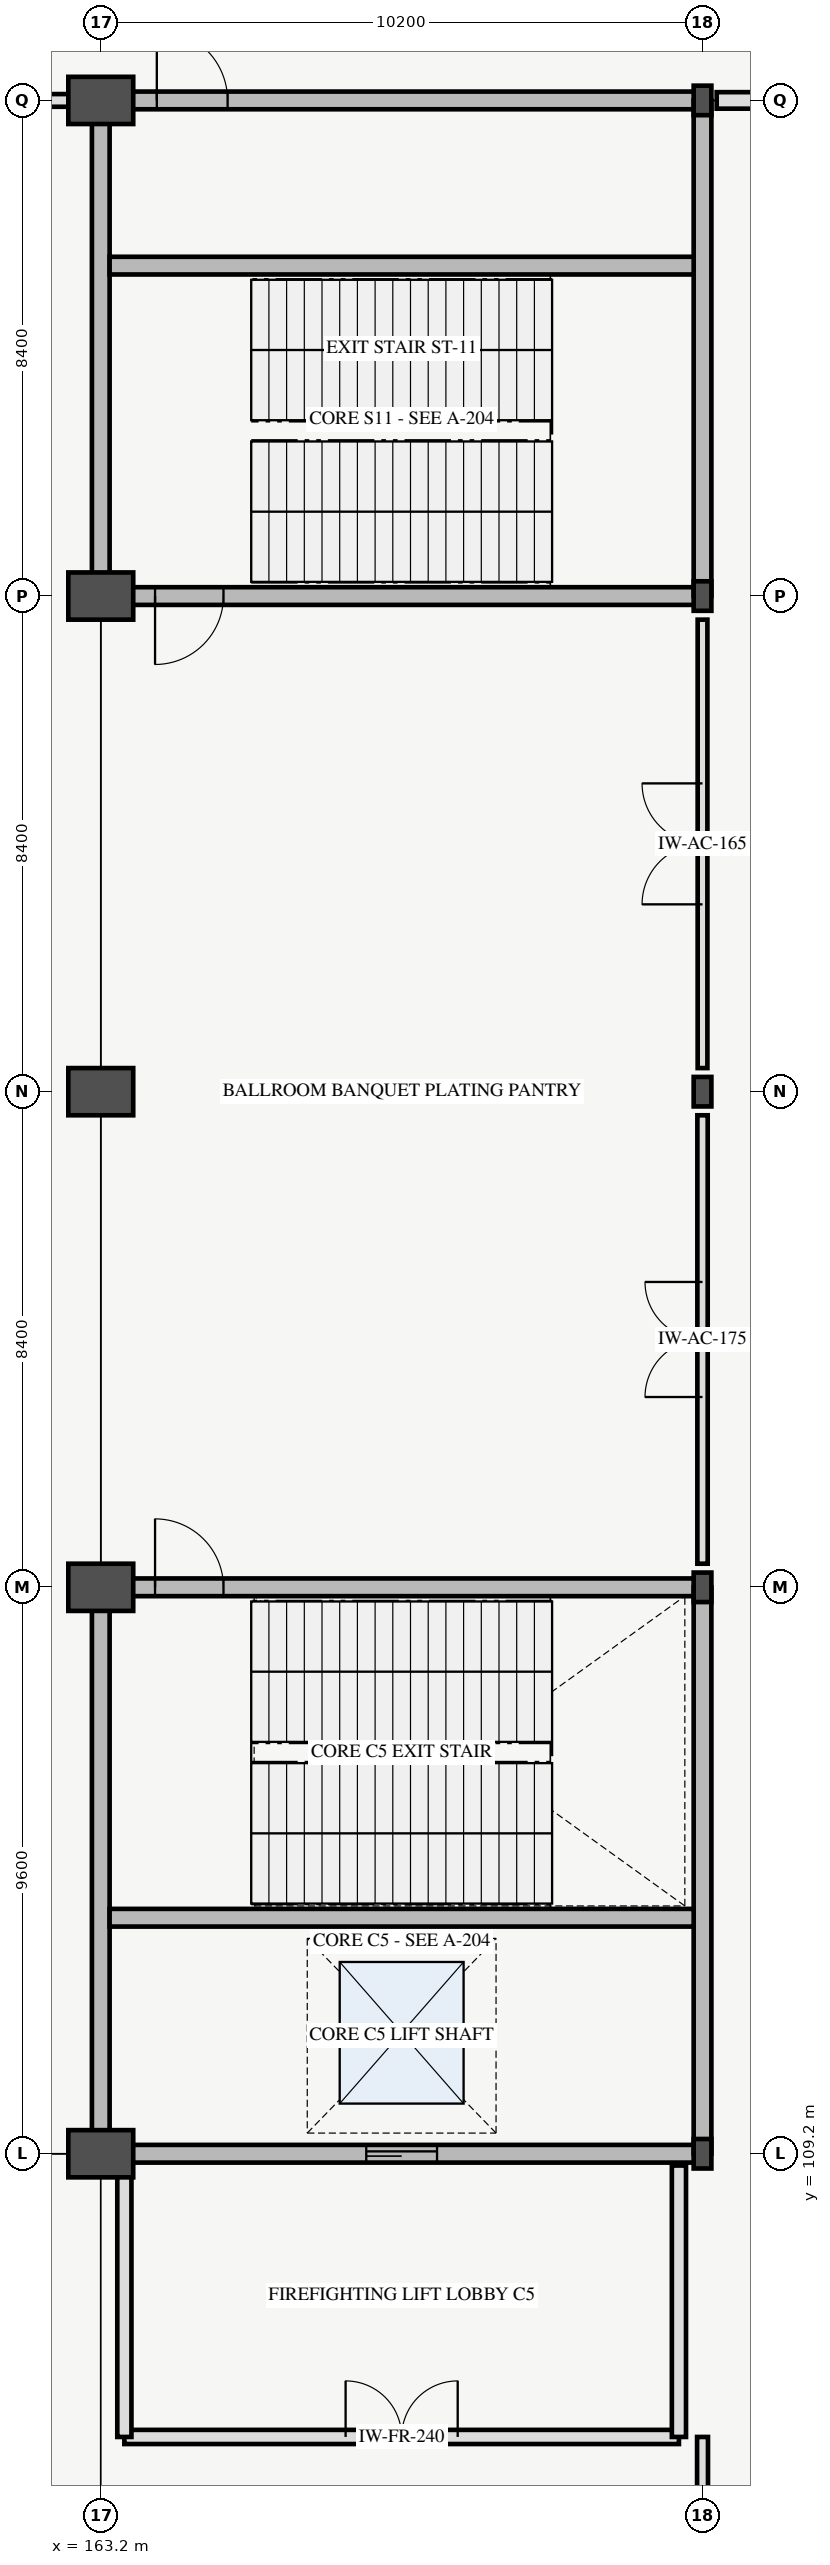
"""IFC4 building model, lengths in metres.
Left out: names, types, materials, properties, quantities, classifications, styles, units other than length and angle.
Written with IfcOpenShell. Run it as: python <this file> out.ifc"""

import sys

from ifc_helpers import new_model, si_unit, direction, frame, frame_2d, origin, origin_2d, place, context, subcontext, project, spatial, rectangle, i_section, extrude, element, fill, save


model = new_model("IFC4")
c1 = context("Model", 3, precision=1e-05, world=origin(), true_north=direction((0.0, 1.0)))
c2 = subcontext(c1, "Body", "Model", "MODEL_VIEW")
j1 = project(units=[si_unit("LENGTHUNIT", "METRE"), si_unit("PLANEANGLEUNIT", "RADIAN")], contexts=[c1])
p1 = place(None, origin())
s1 = spatial("IfcSite", under=j1, at=p1, CompositionType="ELEMENT")
p2 = place(p1, origin())
s2 = spatial("IfcBuilding", under=s1, at=p2, CompositionType="ELEMENT")
p3 = place(p2, origin())
s3 = spatial("IfcBuildingStorey", under=s2, at=p3, CompositionType="ELEMENT", Elevation=0.0)
for number, where, z_axis, x_axis in (
    (1, (163.2, 109.2, 0.0), (0.0, 0.0, 1.0), (1.0, 0.0, 0.0)),
    (2, (163.2, 118.8, 0.0), (0.0, 0.0, 1.0), (1.0, 0.0, 0.0)),
    (3, (163.2, 127.2, 0.0), (0.0, 0.0, 1.0), (1.0, 0.0, 0.0)),
    (4, (163.2, 135.6, 0.0), (0.0, 0.0, 1.0), (1.0, 0.0, 0.0)),
    (5, (163.2, 144.0, 0.0), (0.0, 0.0, 1.0), (1.0, 0.0, 0.0)),
):
    element("IfcColumn", number, at=place(p3, frame(where, z_axis=z_axis, x_axis=x_axis)), inside=s3, PredefinedType="COLUMN", context=c2, shape_type="SweptSolid", body=[
        extrude(rectangle(XDim=1.1, YDim=0.8, at=origin_2d()), origin(), (0.0, 0.0, 1.0), 5.4),
    ])
for number, where, z_axis, x_axis in (
    (6, (173.4, 109.2, 0.0), (0.0, 0.0, 1.0), (1.0, 0.0, 0.0)),
    (7, (173.4, 118.8, 0.0), (0.0, 0.0, 1.0), (1.0, 0.0, 0.0)),
    (8, (173.4, 127.2, 0.0), (0.0, 0.0, 1.0), (1.0, 0.0, 0.0)),
    (9, (173.4, 135.6, 0.0), (0.0, 0.0, 1.0), (1.0, 0.0, 0.0)),
    (10, (173.4, 144.0, 0.0), (0.0, 0.0, 1.0), (1.0, 0.0, 0.0)),
):
    element("IfcColumn", number, at=place(p3, frame(where, z_axis=z_axis, x_axis=x_axis)), inside=s3, PredefinedType="COLUMN", context=c2, shape_type="SweptSolid", body=[
        extrude(i_section(OverallWidth=0.3, OverallDepth=0.5, WebThickness=0.014, FlangeThickness=0.028, FilletRadius=0.027, at=origin_2d()), origin(), (0.0, 0.0, 1.0), 5.4),
    ])
p4 = place(p3, frame((163.2, 109.2, 0.0), z_axis=(0.0, 0.0, 1.0), x_axis=(1.0, 0.0, 0.0)))
e11 = element("IfcWall", 11, at=p4, inside=s3, PredefinedType="SHEAR", context=c2, shape_type="SweptSolid", body=[
    extrude(rectangle(XDim=10.2, YDim=0.3, at=frame_2d((5.1, 0.0))), origin(), (0.0, 0.0, 1.0), 5.4),
])
p5 = place(p4, frame((4.5, 0.0, 0.0)))
e12 = element("IfcOpeningElement", 12, at=p5, cuts=e11, PredefinedType="OPENING", context=c2, shape_type="SweptSolid", body=[
    extrude(rectangle(XDim=1.2, YDim=2.25, at=frame_2d((0.6, 1.125))), frame((0.0, 0.16, 0.0), z_axis=(0.0, -1.0, 0.0), x_axis=(1.0, 0.0, 0.0)), (0.0, 0.0, 1.0), 0.32),
])
p6 = place(p3, frame((163.2, 118.8, 0.0), z_axis=(0.0, 0.0, 1.0), x_axis=(1.0, 0.0, 0.0)))
e13 = element("IfcWall", 13, at=p6, inside=s3, PredefinedType="SHEAR", context=c2, shape_type="SweptSolid", body=[
    extrude(rectangle(XDim=10.2, YDim=0.3, at=frame_2d((5.1, 0.0))), origin(), (0.0, 0.0, 1.0), 5.4),
])
p7 = place(p6, frame((0.92, 0.0, 0.0)))
e14 = element("IfcOpeningElement", 14, at=p7, cuts=e13, PredefinedType="OPENING", context=c2, shape_type="SweptSolid", body=[
    extrude(rectangle(XDim=1.16, YDim=2.2, at=frame_2d((0.58, 1.1))), frame((0.0, 0.16, 0.0), z_axis=(0.0, -1.0, 0.0), x_axis=(1.0, 0.0, 0.0)), (0.0, 0.0, 1.0), 0.32),
])
for number, where, z_axis, x_axis in (
    (15, (163.2, 109.2, 0.0), (0.0, 0.0, 1.0), (0.0, 1.0, 0.0)),
    (16, (173.4, 109.2, 0.0), (0.0, 0.0, 1.0), (0.0, 1.0, 0.0)),
):
    element("IfcWall", number, at=place(p3, frame(where, z_axis=z_axis, x_axis=x_axis)), inside=s3, PredefinedType="SHEAR", context=c2, shape_type="SweptSolid", body=[
        extrude(rectangle(XDim=9.6, YDim=0.3, at=frame_2d((4.8, 0.0))), origin(), (0.0, 0.0, 1.0), 5.4),
    ])
p8 = place(p3, frame((173.64, 144.0, 0.0), z_axis=(0.0, 0.0, 1.0), x_axis=(1.0, 0.0, 0.0)))
e17 = element("IfcWall", 17, at=p8, inside=s3, PredefinedType="STANDARD", context=c2, shape_type="SweptSolid", body=[
    extrude(rectangle(XDim=9.72, YDim=0.28, at=frame_2d((4.86, 0.0))), origin(), (0.0, 0.0, 1.0), 3.68),
])
p9 = place(p8, frame((1.905, 0.0, 0.0)))
e18 = element("IfcOpeningElement", 18, at=p9, cuts=e17, PredefinedType="OPENING", context=c2, shape_type="SweptSolid", body=[
    extrude(rectangle(XDim=2.8, YDim=2.45, at=frame_2d((1.4, 1.225))), frame((0.0, 0.15, 0.0), z_axis=(0.0, -1.0, 0.0), x_axis=(1.0, 0.0, 0.0)), (0.0, 0.0, 1.0), 0.3),
])
p10 = place(p8, frame((5.893, 0.0, 0.0)))
e19 = element("IfcOpeningElement", 19, at=p10, cuts=e17, PredefinedType="OPENING", context=c2, shape_type="SweptSolid", body=[
    extrude(rectangle(XDim=2.6, YDim=2.4, at=frame_2d((1.3, 1.2))), frame((0.0, 0.15, 0.0), z_axis=(0.0, -1.0, 0.0), x_axis=(1.0, 0.0, 0.0)), (0.0, 0.0, 1.0), 0.3),
])
p11 = place(p3, frame((122.64, 144.0, 0.0), z_axis=(0.0, 0.0, 1.0), x_axis=(1.0, 0.0, 0.0)))
e20 = element("IfcWall", 20, at=p11, inside=s3, PredefinedType="SOLIDWALL", context=c2, shape_type="SweptSolid", body=[
    extrude(rectangle(XDim=40.32, YDim=0.215, at=frame_2d((20.16, 0.0))), origin(), (0.0, 0.0, 1.0), 3.68),
])
p12 = place(p11, frame((7.68, 0.0, 0.0)))
e21 = element("IfcOpeningElement", 21, at=p12, cuts=e20, PredefinedType="OPENING", context=c2, shape_type="SweptSolid", body=[
    extrude(rectangle(XDim=4.8, YDim=3.4, at=frame_2d((2.4, 1.7))), frame((0.0, 0.117, 0.0), z_axis=(0.0, -1.0, 0.0), x_axis=(1.0, 0.0, 0.0)), (0.0, 0.0, 1.0), 0.235),
])
p13 = place(p11, frame((29.69, 0.0, 0.0)))
e22 = element("IfcOpeningElement", 22, at=p13, cuts=e20, PredefinedType="OPENING", context=c2, shape_type="SweptSolid", body=[
    extrude(rectangle(XDim=1.1, YDim=2.2, at=frame_2d((0.55, 1.1))), frame((0.0, 0.117, 0.0), z_axis=(0.0, -1.0, 0.0), x_axis=(1.0, 0.0, 0.0)), (0.0, 0.0, 1.0), 0.235),
])
p14 = place(p3, frame((163.35, 113.2, 0.0), z_axis=(0.0, 0.0, 1.0), x_axis=(1.0, 0.0, 0.0)))
e23 = element("IfcWall", 23, at=p14, inside=s3, PredefinedType="SHEAR", context=c2, shape_type="SweptSolid", body=[
    extrude(rectangle(XDim=9.9, YDim=0.3, at=frame_2d((4.95, 0.0))), origin(), (0.0, 0.0, 1.0), 5.4),
])
p15 = place(p3, frame((163.2, 135.6, 0.0), z_axis=(0.0, 0.0, 1.0), x_axis=(1.0, 0.0, 0.0)))
e24 = element("IfcWall", 24, at=p15, inside=s3, PredefinedType="SHEAR", context=c2, shape_type="SweptSolid", body=[
    extrude(rectangle(XDim=10.2, YDim=0.3, at=frame_2d((5.1, 0.0))), origin(), (0.0, 0.0, 1.0), 5.4),
])
p16 = place(p15, frame((0.92, 0.0, 0.0)))
e25 = element("IfcOpeningElement", 25, at=p16, cuts=e24, PredefinedType="OPENING", context=c2, shape_type="SweptSolid", body=[
    extrude(rectangle(XDim=1.16, YDim=2.2, at=frame_2d((0.58, 1.1))), frame((0.0, 0.16, 0.0), z_axis=(0.0, -1.0, 0.0), x_axis=(1.0, 0.0, 0.0)), (0.0, 0.0, 1.0), 0.32),
])
p17 = place(p3, frame((163.2, 144.0, 0.0), z_axis=(0.0, 0.0, 1.0), x_axis=(1.0, 0.0, 0.0)))
e26 = element("IfcWall", 26, at=p17, inside=s3, PredefinedType="SHEAR", context=c2, shape_type="SweptSolid", body=[
    extrude(rectangle(XDim=10.2, YDim=0.3, at=frame_2d((5.1, 0.0))), origin(), (0.0, 0.0, 1.0), 5.4),
])
p18 = place(p17, frame((0.95, 0.0, 0.0)))
e27 = element("IfcOpeningElement", 27, at=p18, cuts=e26, PredefinedType="OPENING", context=c2, shape_type="SweptSolid", body=[
    extrude(rectangle(XDim=1.2, YDim=2.2, at=frame_2d((0.6, 1.1))), frame((0.0, 0.16, 0.0), z_axis=(0.0, -1.0, 0.0), x_axis=(1.0, 0.0, 0.0)), (0.0, 0.0, 1.0), 0.32),
])
for number, where, z_axis, x_axis in (
    (28, (163.2, 135.6, 0.0), (0.0, 0.0, 1.0), (0.0, 1.0, 0.0)),
    (29, (173.4, 135.6, 0.0), (0.0, 0.0, 1.0), (0.0, 1.0, 0.0)),
):
    element("IfcWall", number, at=place(p3, frame(where, z_axis=z_axis, x_axis=x_axis)), inside=s3, PredefinedType="SHEAR", context=c2, shape_type="SweptSolid", body=[
        extrude(rectangle(XDim=8.4, YDim=0.3, at=frame_2d((4.2, 0.0))), origin(), (0.0, 0.0, 1.0), 5.4),
    ])
p19 = place(p3, frame((163.35, 141.2, 0.0), z_axis=(0.0, 0.0, 1.0), x_axis=(1.0, 0.0, 0.0)))
e30 = element("IfcWall", 30, at=p19, inside=s3, PredefinedType="SHEAR", context=c2, shape_type="SweptSolid", body=[
    extrude(rectangle(XDim=9.9, YDim=0.3, at=frame_2d((4.95, 0.0))), origin(), (0.0, 0.0, 1.0), 5.4),
])
p20 = place(p3, frame((163.6, 104.4, 0.0), z_axis=(0.0, 0.0, 1.0), x_axis=(1.0, 0.0, 0.0)))
e31 = element("IfcWall", 31, at=p20, inside=s3, PredefinedType="PARTITIONING", context=c2, shape_type="SweptSolid", body=[
    extrude(rectangle(XDim=9.4, YDim=0.24, at=frame_2d((4.7, 0.0))), origin(), (0.0, 0.0, 1.0), 4.08),
])
p21 = place(p20, frame((3.75, 0.0, 0.0)))
e32 = element("IfcOpeningElement", 32, at=p21, cuts=e31, PredefinedType="OPENING", context=c2, shape_type="SweptSolid", body=[
    extrude(rectangle(XDim=1.9, YDim=2.25, at=frame_2d((0.95, 1.125))), frame((0.0, 0.13, 0.0), z_axis=(0.0, -1.0, 0.0), x_axis=(1.0, 0.0, 0.0)), (0.0, 0.0, 1.0), 0.26),
])
for number, where, z_axis, x_axis in (
    (33, (163.6, 104.4, 0.0), (0.0, 0.0, 1.0), (0.0, 1.0, 0.0)),
    (34, (173.0, 104.4, 0.0), (0.0, 0.0, 1.0), (0.0, 1.0, 0.0)),
):
    element("IfcWall", number, at=place(p3, frame(where, z_axis=z_axis, x_axis=x_axis)), inside=s3, PredefinedType="PARTITIONING", context=c2, shape_type="SweptSolid", body=[
        extrude(rectangle(XDim=4.6, YDim=0.24, at=frame_2d((2.3, 0.0))), origin(), (0.0, 0.0, 1.0), 4.08),
    ])
p22 = place(p3, frame((173.4, 100.0, 0.0), z_axis=(0.0, 0.0, 1.0), x_axis=(0.0, 1.0, 0.0)))
e35 = element("IfcWall", 35, at=p22, inside=s3, PredefinedType="PARTITIONING", context=c2, shape_type="SweptSolid", body=[
    extrude(rectangle(XDim=4.4, YDim=0.185, at=frame_2d((2.2, 0.0))), origin(), (0.0, 0.0, 1.0), 4.08),
])
p23 = place(p22, frame((1.275, 0.0, 0.0)))
e36 = element("IfcOpeningElement", 36, at=p23, cuts=e35, PredefinedType="OPENING", context=c2, shape_type="SweptSolid", body=[
    extrude(rectangle(XDim=1.85, YDim=2.32, at=frame_2d((0.925, 1.16))), frame((0.0, 0.103, 0.0), z_axis=(0.0, -1.0, 0.0), x_axis=(1.0, 0.0, 0.0)), (0.0, 0.0, 1.0), 0.205),
])
p24 = place(p3, frame((173.4, 119.2, 0.0), z_axis=(0.0, 0.0, 1.0), x_axis=(0.0, 1.0, 0.0)))
e37 = element("IfcWall", 37, at=p24, inside=s3, PredefinedType="PARTITIONING", context=c2, shape_type="SweptSolid", body=[
    extrude(rectangle(XDim=7.6, YDim=0.175, at=frame_2d((3.8, 0.0))), origin(), (0.0, 0.0, 1.0), 4.08),
])
p25 = place(p24, frame((2.825, 0.0, 0.0)))
e38 = element("IfcOpeningElement", 38, at=p25, cuts=e37, PredefinedType="OPENING", context=c2, shape_type="SweptSolid", body=[
    extrude(rectangle(XDim=1.95, YDim=2.34, at=frame_2d((0.975, 1.17))), frame((0.0, 0.097, 0.0), z_axis=(0.0, -1.0, 0.0), x_axis=(1.0, 0.0, 0.0)), (0.0, 0.0, 1.0), 0.195),
])
p26 = place(p3, frame((173.4, 127.6, 0.0), z_axis=(0.0, 0.0, 1.0), x_axis=(0.0, 1.0, 0.0)))
e39 = element("IfcWall", 39, at=p26, inside=s3, PredefinedType="PARTITIONING", context=c2, shape_type="SweptSolid", body=[
    extrude(rectangle(XDim=7.6, YDim=0.165, at=frame_2d((3.8, 0.0))), origin(), (0.0, 0.0, 1.0), 4.08),
])
p27 = place(p26, frame((2.775, 0.0, 0.0)))
e40 = element("IfcOpeningElement", 40, at=p27, cuts=e39, PredefinedType="OPENING", context=c2, shape_type="SweptSolid", body=[
    extrude(rectangle(XDim=2.05, YDim=2.36, at=frame_2d((1.025, 1.18))), frame((0.0, 0.093, 0.0), z_axis=(0.0, -1.0, 0.0), x_axis=(1.0, 0.0, 0.0)), (0.0, 0.0, 1.0), 0.185),
])
p28 = place(p7, origin())
e41 = element("IfcDoor", 41, at=p28, inside=s3, OperationType="SINGLE_SWING_LEFT", PredefinedType="DOOR", context=c2, shape_type="SweptSolid", body=[
    extrude(rectangle(XDim=1.16, YDim=2.2, at=frame_2d((0.58, 1.1))), frame((0.0, 0.025, 0.0), z_axis=(0.0, -1.0, 0.0), x_axis=(1.0, 0.0, 0.0)), (0.0, 0.0, 1.0), 0.05),
])
fill(e14, e41)
p29 = place(p5, origin())
e42 = element("IfcDoor", 42, at=p29, inside=s3, OperationType="SLIDING_TO_LEFT", PredefinedType="DOOR", context=c2, shape_type="SweptSolid", body=[
    extrude(rectangle(XDim=1.2, YDim=2.25, at=frame_2d((0.6, 1.125))), frame((0.0, 0.025, 0.0), z_axis=(0.0, -1.0, 0.0), x_axis=(1.0, 0.0, 0.0)), (0.0, 0.0, 1.0), 0.05),
])
fill(e12, e42)
p30 = place(p16, origin())
e43 = element("IfcDoor", 43, at=p30, inside=s3, OperationType="SINGLE_SWING_LEFT", PredefinedType="DOOR", context=c2, shape_type="SweptSolid", body=[
    extrude(rectangle(XDim=1.16, YDim=2.2, at=frame_2d((0.58, 1.1))), frame((0.0, 0.025, 0.0), z_axis=(0.0, -1.0, 0.0), x_axis=(1.0, 0.0, 0.0)), (0.0, 0.0, 1.0), 0.05),
])
fill(e25, e43)
p31 = place(p18, origin())
e44 = element("IfcDoor", 44, at=p31, inside=s3, OperationType="SINGLE_SWING_LEFT", PredefinedType="DOOR", context=c2, shape_type="SweptSolid", body=[
    extrude(rectangle(XDim=1.2, YDim=2.2, at=frame_2d((0.6, 1.1))), frame((0.0, 0.025, 0.0), z_axis=(0.0, -1.0, 0.0), x_axis=(1.0, 0.0, 0.0)), (0.0, 0.0, 1.0), 0.05),
])
fill(e27, e44)
p32 = place(p21, origin())
e45 = element("IfcDoor", 45, at=p32, inside=s3, OperationType="DOUBLE_DOOR_SINGLE_SWING", PredefinedType="DOOR", context=c2, shape_type="SweptSolid", body=[
    extrude(rectangle(XDim=1.9, YDim=2.25, at=frame_2d((0.95, 1.125))), frame((0.0, 0.025, 0.0), z_axis=(0.0, -1.0, 0.0), x_axis=(1.0, 0.0, 0.0)), (0.0, 0.0, 1.0), 0.05),
])
fill(e32, e45)
p33 = place(p25, origin())
e46 = element("IfcDoor", 46, at=p33, inside=s3, OperationType="DOUBLE_DOOR_SINGLE_SWING", PredefinedType="DOOR", context=c2, shape_type="SweptSolid", body=[
    extrude(rectangle(XDim=1.95, YDim=2.34, at=frame_2d((0.975, 1.17))), frame((0.0, 0.025, 0.0), z_axis=(0.0, -1.0, 0.0), x_axis=(1.0, 0.0, 0.0)), (0.0, 0.0, 1.0), 0.05),
])
fill(e38, e46)
p34 = place(p27, origin())
e47 = element("IfcDoor", 47, at=p34, inside=s3, OperationType="DOUBLE_DOOR_SINGLE_SWING", PredefinedType="DOOR", context=c2, shape_type="SweptSolid", body=[
    extrude(rectangle(XDim=2.05, YDim=2.36, at=frame_2d((1.025, 1.18))), frame((0.0, 0.025, 0.0), z_axis=(0.0, -1.0, 0.0), x_axis=(1.0, 0.0, 0.0)), (0.0, 0.0, 1.0), 0.05),
])
fill(e40, e47)
save(model, sys.argv[1])
